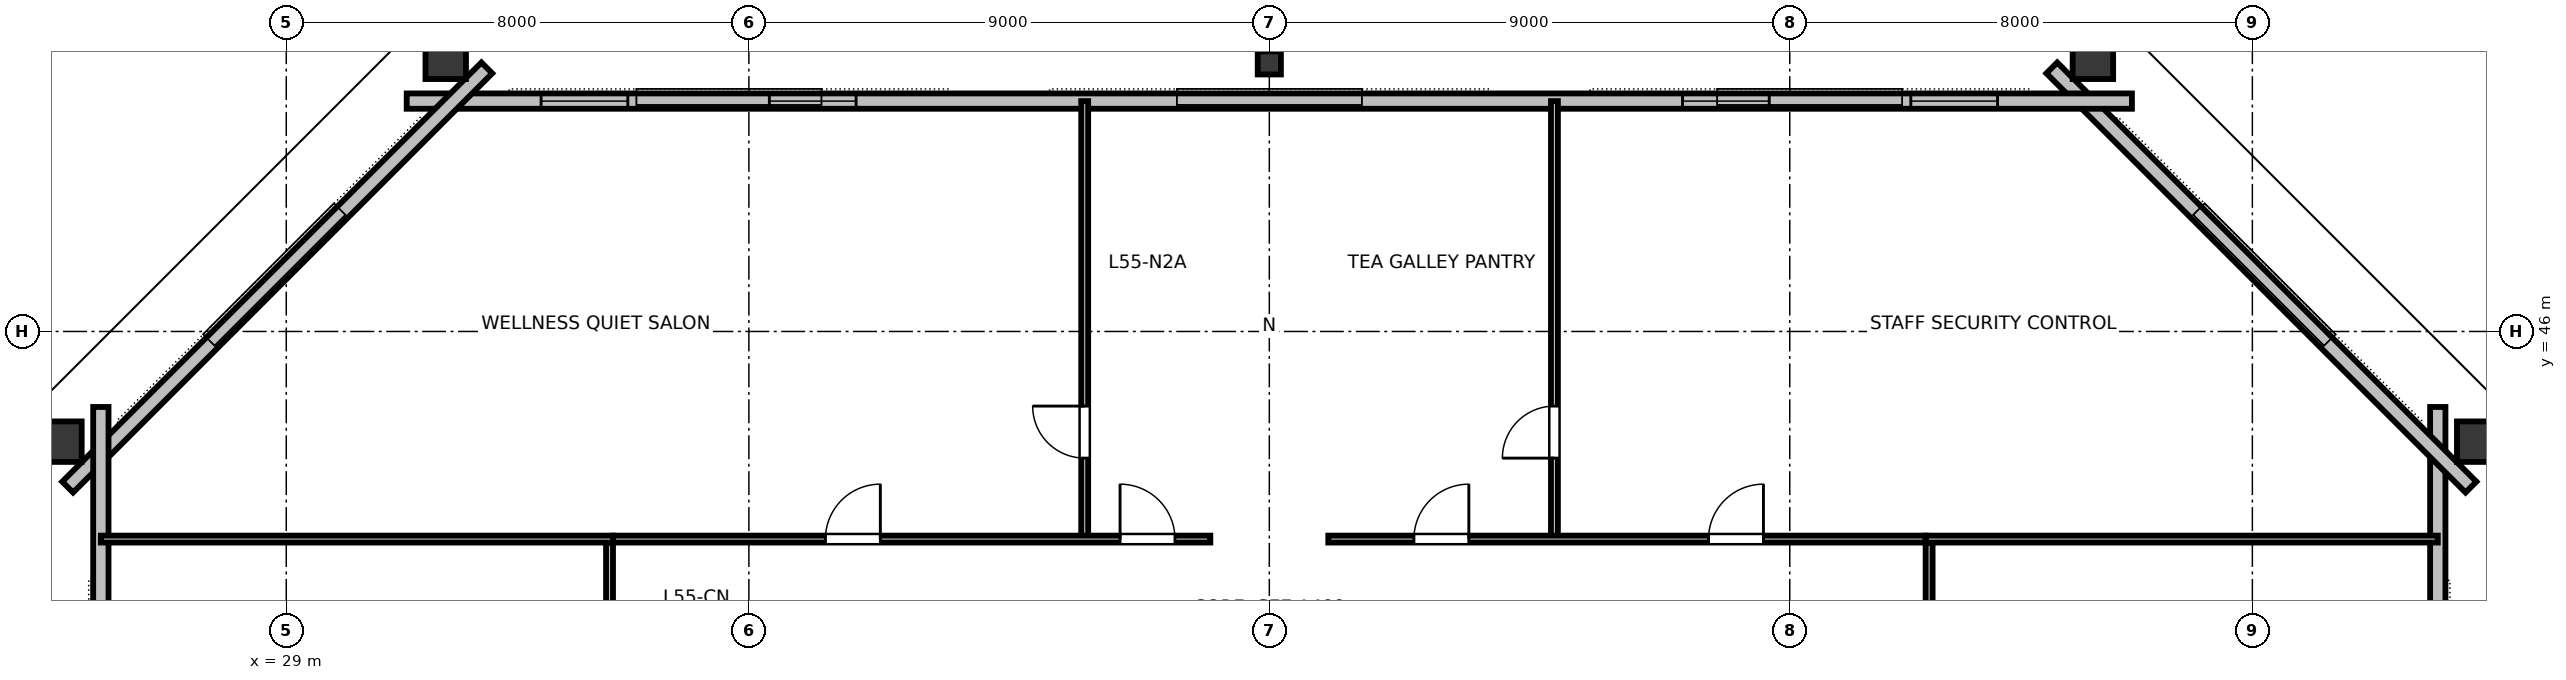
"""IFC4 building model, lengths in metres.
Left out: names, types, materials, properties, quantities, classifications, styles, units other than length and angle.
Written with IfcOpenShell. Run it as: python <this file> out.ifc"""

import sys

from ifc_helpers import new_model, si_unit, direction, frame, frame_2d, origin, origin_2d, place, context, subcontext, project, spatial, rectangle, hollow_rectangle, i_section, extrude, element, fill, save


model = new_model("IFC4")
c1 = context("Model", 3, precision=1e-05, world=origin(), true_north=direction((0.0, 1.0)))
c2 = subcontext(c1, "Body", "Model", "MODEL_VIEW")
j1 = project(units=[si_unit("LENGTHUNIT", "METRE"), si_unit("PLANEANGLEUNIT", "RADIAN")], contexts=[c1])
p1 = place(None, origin())
s1 = spatial("IfcSite", under=j1, at=p1, CompositionType="ELEMENT")
p2 = place(p1, origin())
s2 = spatial("IfcBuilding", under=s1, at=p2, CompositionType="ELEMENT")
p3 = place(p2, frame((0.0, 0.0, 209.4)))
s3 = spatial("IfcBuildingStorey", under=s2, at=p3, CompositionType="ELEMENT", Elevation=209.4)
for number, where, z_axis, x_axis in (
    (1, (66.963, 44.095, 0.0), (0.0, 0.0, 1.0), (0.0, 1.0, 0.0)),
    (2, (60.242, 50.79, 0.0), (0.0, 0.0, 1.0), (1.0, 0.0, 0.0)),
):
    element("IfcColumn", number, at=place(p3, frame(where, z_axis=z_axis, x_axis=x_axis)), inside=s3, PredefinedType="COLUMN", context=c2, shape_type="SweptSolid", body=[
        extrude(hollow_rectangle(XDim=0.7, YDim=0.85, WallThickness=0.04, at=origin_2d()), origin(), (0.0, 0.0, 1.0), 3.373),
    ])
p4 = place(p3, frame((46.0, 50.644, 0.0), z_axis=(0.0, 0.0, 1.0), x_axis=(1.0, 0.0, 0.0)))
e3 = element("IfcColumn", 3, at=p4, inside=s3, PredefinedType="COLUMN", context=c2, shape_type="SweptSolid", body=[
    extrude(i_section(OverallWidth=0.401, OverallDepth=0.399, WebThickness=0.025, FlangeThickness=0.04, FilletRadius=0.025, at=origin_2d()), origin(), (0.0, 0.0, 1.0), 3.373),
])
for number, where, z_axis, x_axis in (
    (4, (31.758, 50.79, 0.0), (0.0, 0.0, 1.0), (1.0, 0.0, 0.0)),
    (5, (25.037, 44.095, 0.0), (0.0, 0.0, 1.0), (0.0, 1.0, 0.0)),
):
    element("IfcColumn", number, at=place(p3, frame(where, z_axis=z_axis, x_axis=x_axis)), inside=s3, PredefinedType="COLUMN", context=c2, shape_type="SweptSolid", body=[
        extrude(hollow_rectangle(XDim=0.7, YDim=0.85, WallThickness=0.04, at=origin_2d()), origin(), (0.0, 0.0, 1.0), 3.373),
    ])
p5 = place(p3, frame((66.206, 19.305, 0.0), z_axis=(0.0, 0.0, 1.0), x_axis=(0.0, 1.0, 0.0)))
e6 = element("IfcWall", 6, at=p5, inside=s3, PredefinedType="STANDARD", context=c2, shape_type="SweptSolid", body=[
    extrude(rectangle(XDim=25.389, YDim=0.265, at=frame_2d((12.695, 0.0))), origin(), (0.0, 0.0, 1.0), 3.375),
])
p6 = place(p5, frame((6.147, 0.0, 0.85)))
e7 = element("IfcOpeningElement", 7, at=p6, cuts=e6, PredefinedType="OPENING", context=c2, shape_type="SweptSolid", body=[
    extrude(rectangle(XDim=1.5, YDim=1.85, at=frame_2d((0.75, 0.925))), frame((0.0, 0.142, 0.0), z_axis=(0.0, -1.0, 0.0), x_axis=(1.0, 0.0, 0.0)), (0.0, 0.0, 1.0), 0.285),
])
p7 = place(p5, frame((17.742, 0.0, 0.85)))
e8 = element("IfcOpeningElement", 8, at=p7, cuts=e6, PredefinedType="OPENING", context=c2, shape_type="SweptSolid", body=[
    extrude(rectangle(XDim=1.5, YDim=1.85, at=frame_2d((0.75, 0.925))), frame((0.0, 0.142, 0.0), z_axis=(0.0, -1.0, 0.0), x_axis=(1.0, 0.0, 0.0)), (0.0, 0.0, 1.0), 0.285),
])
p8 = place(p3, frame((66.78, 43.309, 0.0), z_axis=(0.0, 0.0, 1.0), x_axis=(-0.707106781187, 0.707106781187, 0.0)))
e9 = element("IfcWall", 9, at=p8, inside=s3, PredefinedType="STANDARD", context=c2, shape_type="SweptSolid", body=[
    extrude(rectangle(XDim=10.251, YDim=0.265, at=frame_2d((5.125, 0.0))), origin(), (0.0, 0.0, 1.0), 3.375),
])
p9 = place(p3, frame((60.917, 49.984, 0.0), z_axis=(0.0, 0.0, 1.0), x_axis=(-1.0, 0.0, 0.0)))
e10 = element("IfcWall", 10, at=p9, inside=s3, PredefinedType="STANDARD", context=c2, shape_type="SweptSolid", body=[
    extrude(rectangle(XDim=29.834, YDim=0.265, at=frame_2d((14.917, 0.0))), origin(), (0.0, 0.0, 1.0), 3.375),
])
p10 = place(p9, frame((2.324, 0.0, 0.85)))
e11 = element("IfcOpeningElement", 11, at=p10, cuts=e10, PredefinedType="OPENING", context=c2, shape_type="SweptSolid", body=[
    extrude(rectangle(XDim=1.5, YDim=1.85, at=frame_2d((0.75, 0.925))), frame((0.0, 0.142, 0.0), z_axis=(0.0, -1.0, 0.0), x_axis=(1.0, 0.0, 0.0)), (0.0, 0.0, 1.0), 0.285),
])
p11 = place(p9, frame((6.272, 0.0, 0.85)))
e12 = element("IfcOpeningElement", 12, at=p11, cuts=e10, PredefinedType="OPENING", context=c2, shape_type="SweptSolid", body=[
    extrude(rectangle(XDim=1.5, YDim=1.85, at=frame_2d((0.75, 0.925))), frame((0.0, 0.142, 0.0), z_axis=(0.0, -1.0, 0.0), x_axis=(1.0, 0.0, 0.0)), (0.0, 0.0, 1.0), 0.285),
])
p12 = place(p9, frame((22.063, 0.0, 0.85)))
e13 = element("IfcOpeningElement", 13, at=p12, cuts=e10, PredefinedType="OPENING", context=c2, shape_type="SweptSolid", body=[
    extrude(rectangle(XDim=1.5, YDim=1.85, at=frame_2d((0.75, 0.925))), frame((0.0, 0.142, 0.0), z_axis=(0.0, -1.0, 0.0), x_axis=(1.0, 0.0, 0.0)), (0.0, 0.0, 1.0), 0.285),
])
p13 = place(p9, frame((26.011, 0.0, 0.85)))
e14 = element("IfcOpeningElement", 14, at=p13, cuts=e10, PredefinedType="OPENING", context=c2, shape_type="SweptSolid", body=[
    extrude(rectangle(XDim=1.5, YDim=1.85, at=frame_2d((0.75, 0.925))), frame((0.0, 0.142, 0.0), z_axis=(0.0, -1.0, 0.0), x_axis=(1.0, 0.0, 0.0)), (0.0, 0.0, 1.0), 0.285),
])
p14 = place(p3, frame((32.468, 50.558, 0.0), z_axis=(0.0, 0.0, 1.0), x_axis=(-0.707106781187, -0.707106781187, 0.0)))
e15 = element("IfcWall", 15, at=p14, inside=s3, PredefinedType="STANDARD", context=c2, shape_type="SweptSolid", body=[
    extrude(rectangle(XDim=10.251, YDim=0.265, at=frame_2d((5.125, 0.0))), origin(), (0.0, 0.0, 1.0), 3.375),
])
p15 = place(p3, frame((25.794, 44.695, 0.0), z_axis=(0.0, 0.0, 1.0), x_axis=(0.0, -1.0, 0.0)))
e16 = element("IfcWall", 16, at=p15, inside=s3, PredefinedType="STANDARD", context=c2, shape_type="SweptSolid", body=[
    extrude(rectangle(XDim=25.389, YDim=0.265, at=frame_2d((12.695, 0.0))), origin(), (0.0, 0.0, 1.0), 3.375),
])
p16 = place(p15, frame((6.147, 0.0, 0.85)))
e17 = element("IfcOpeningElement", 17, at=p16, cuts=e16, PredefinedType="OPENING", context=c2, shape_type="SweptSolid", body=[
    extrude(rectangle(XDim=1.5, YDim=1.85, at=frame_2d((0.75, 0.925))), frame((0.0, 0.142, 0.0), z_axis=(0.0, -1.0, 0.0), x_axis=(1.0, 0.0, 0.0)), (0.0, 0.0, 1.0), 0.285),
])
p17 = place(p15, frame((10.012, 0.0, 0.85)))
e18 = element("IfcOpeningElement", 18, at=p17, cuts=e16, PredefinedType="OPENING", context=c2, shape_type="SweptSolid", body=[
    extrude(rectangle(XDim=1.5, YDim=1.85, at=frame_2d((0.75, 0.925))), frame((0.0, 0.142, 0.0), z_axis=(0.0, -1.0, 0.0), x_axis=(1.0, 0.0, 0.0)), (0.0, 0.0, 1.0), 0.285),
])
p18 = place(p15, frame((13.877, 0.0, 0.85)))
e19 = element("IfcOpeningElement", 19, at=p18, cuts=e16, PredefinedType="OPENING", context=c2, shape_type="SweptSolid", body=[
    extrude(rectangle(XDim=1.5, YDim=1.85, at=frame_2d((0.75, 0.925))), frame((0.0, 0.142, 0.0), z_axis=(0.0, -1.0, 0.0), x_axis=(1.0, 0.0, 0.0)), (0.0, 0.0, 1.0), 0.285),
])
p19 = place(p15, frame((17.742, 0.0, 0.85)))
e20 = element("IfcOpeningElement", 20, at=p19, cuts=e16, PredefinedType="OPENING", context=c2, shape_type="SweptSolid", body=[
    extrude(rectangle(XDim=1.5, YDim=1.85, at=frame_2d((0.75, 0.925))), frame((0.0, 0.142, 0.0), z_axis=(0.0, -1.0, 0.0), x_axis=(1.0, 0.0, 0.0)), (0.0, 0.0, 1.0), 0.285),
])
p20 = place(p3, frame((42.807, 42.41, 0.0), z_axis=(0.0, 0.0, 1.0), x_axis=(0.0, 1.0, 0.0)))
e21 = element("IfcWall", 21, at=p20, inside=s3, PredefinedType="PARTITIONING", context=c2, shape_type="SweptSolid", body=[
    extrude(rectangle(XDim=7.574, YDim=0.12, at=frame_2d((3.787, 0.0))), origin(), (0.0, 0.0, 1.0), 2.655),
])
p21 = place(p20, frame((1.4, 0.0, 0.0)))
e22 = element("IfcOpeningElement", 22, at=p21, cuts=e21, PredefinedType="OPENING", context=c2, shape_type="SweptSolid", body=[
    extrude(rectangle(XDim=0.9, YDim=2.15, at=frame_2d((0.45, 1.075))), frame((0.0, 0.07, 0.0), z_axis=(0.0, -1.0, 0.0), x_axis=(1.0, 0.0, 0.0)), (0.0, 0.0, 1.0), 0.14),
])
p22 = place(p3, frame((50.93, 42.41, 0.0), z_axis=(0.0, 0.0, 1.0), x_axis=(0.0, 1.0, 0.0)))
e23 = element("IfcWall", 23, at=p22, inside=s3, PredefinedType="PARTITIONING", context=c2, shape_type="SweptSolid", body=[
    extrude(rectangle(XDim=7.574, YDim=0.12, at=frame_2d((3.787, 0.0))), origin(), (0.0, 0.0, 1.0), 2.655),
])
p23 = place(p22, frame((1.4, 0.0, 0.0)))
e24 = element("IfcOpeningElement", 24, at=p23, cuts=e23, PredefinedType="OPENING", context=c2, shape_type="SweptSolid", body=[
    extrude(rectangle(XDim=0.9, YDim=2.15, at=frame_2d((0.45, 1.075))), frame((0.0, 0.07, 0.0), z_axis=(0.0, -1.0, 0.0), x_axis=(1.0, 0.0, 0.0)), (0.0, 0.0, 1.0), 0.14),
])
p24 = place(p3, frame((34.65, 42.41, 0.0), z_axis=(0.0, 0.0, 1.0), x_axis=(1.0, 0.0, 0.0)))
e25 = element("IfcWall", 25, at=p24, inside=s3, PredefinedType="PARTITIONING", context=c2, shape_type="SweptSolid", body=[
    extrude(rectangle(XDim=10.33, YDim=0.12, at=frame_2d((5.165, 0.0))), origin(), (0.0, 0.0, 1.0), 2.655),
])
p25 = place(p24, frame((3.674, 0.0, 0.0)))
e26 = element("IfcOpeningElement", 26, at=p25, cuts=e25, PredefinedType="OPENING", context=c2, shape_type="SweptSolid", body=[
    extrude(rectangle(XDim=0.95, YDim=2.15, at=frame_2d((0.475, 1.075))), frame((0.0, 0.07, 0.0), z_axis=(0.0, -1.0, 0.0), x_axis=(1.0, 0.0, 0.0)), (0.0, 0.0, 1.0), 0.14),
])
p26 = place(p24, frame((8.769, 0.0, 0.0)))
e27 = element("IfcOpeningElement", 27, at=p26, cuts=e25, PredefinedType="OPENING", context=c2, shape_type="SweptSolid", body=[
    extrude(rectangle(XDim=0.95, YDim=2.15, at=frame_2d((0.475, 1.075))), frame((0.0, 0.07, 0.0), z_axis=(0.0, -1.0, 0.0), x_axis=(1.0, 0.0, 0.0)), (0.0, 0.0, 1.0), 0.14),
])
p27 = place(p3, frame((47.02, 42.41, 0.0), z_axis=(0.0, 0.0, 1.0), x_axis=(1.0, 0.0, 0.0)))
e28 = element("IfcWall", 28, at=p27, inside=s3, PredefinedType="PARTITIONING", context=c2, shape_type="SweptSolid", body=[
    extrude(rectangle(XDim=10.33, YDim=0.12, at=frame_2d((5.165, 0.0))), origin(), (0.0, 0.0, 1.0), 2.655),
])
p28 = place(p27, frame((1.48, 0.0, 0.0)))
e29 = element("IfcOpeningElement", 29, at=p28, cuts=e28, PredefinedType="OPENING", context=c2, shape_type="SweptSolid", body=[
    extrude(rectangle(XDim=0.95, YDim=2.15, at=frame_2d((0.475, 1.075))), frame((0.0, 0.07, 0.0), z_axis=(0.0, -1.0, 0.0), x_axis=(1.0, 0.0, 0.0)), (0.0, 0.0, 1.0), 0.14),
])
p29 = place(p27, frame((6.575, 0.0, 0.0)))
e30 = element("IfcOpeningElement", 30, at=p29, cuts=e28, PredefinedType="OPENING", context=c2, shape_type="SweptSolid", body=[
    extrude(rectangle(XDim=0.95, YDim=2.15, at=frame_2d((0.475, 1.075))), frame((0.0, 0.07, 0.0), z_axis=(0.0, -1.0, 0.0), x_axis=(1.0, 0.0, 0.0)), (0.0, 0.0, 1.0), 0.14),
])
p30 = place(p3, frame((34.59, 21.65, 0.0), z_axis=(0.0, 0.0, 1.0), x_axis=(0.0, 1.0, 0.0)))
e31 = element("IfcWall", 31, at=p30, inside=s3, PredefinedType="PARTITIONING", context=c2, shape_type="SweptSolid", body=[
    extrude(rectangle(XDim=20.7, YDim=0.12, at=frame_2d((10.35, 0.0))), origin(), (0.0, 0.0, 1.0), 2.655),
])
p31 = place(p30, frame((9.875, 0.0, 0.0)))
e32 = element("IfcOpeningElement", 32, at=p31, cuts=e31, PredefinedType="OPENING", context=c2, shape_type="SweptSolid", body=[
    extrude(rectangle(XDim=0.95, YDim=2.15, at=frame_2d((0.475, 1.075))), frame((0.0, 0.07, 0.0), z_axis=(0.0, -1.0, 0.0), x_axis=(1.0, 0.0, 0.0)), (0.0, 0.0, 1.0), 0.14),
])
p32 = place(p3, frame((57.41, 21.65, 0.0), z_axis=(0.0, 0.0, 1.0), x_axis=(0.0, 1.0, 0.0)))
e33 = element("IfcWall", 33, at=p32, inside=s3, PredefinedType="PARTITIONING", context=c2, shape_type="SweptSolid", body=[
    extrude(rectangle(XDim=20.7, YDim=0.12, at=frame_2d((10.35, 0.0))), origin(), (0.0, 0.0, 1.0), 2.655),
])
p33 = place(p32, frame((3.546, 0.0, 0.0)))
e34 = element("IfcOpeningElement", 34, at=p33, cuts=e33, PredefinedType="OPENING", context=c2, shape_type="SweptSolid", body=[
    extrude(rectangle(XDim=0.95, YDim=2.15, at=frame_2d((0.475, 1.075))), frame((0.0, 0.07, 0.0), z_axis=(0.0, -1.0, 0.0), x_axis=(1.0, 0.0, 0.0)), (0.0, 0.0, 1.0), 0.14),
])
p34 = place(p32, frame((10.054, 0.0, 0.0)))
e35 = element("IfcOpeningElement", 35, at=p34, cuts=e33, PredefinedType="OPENING", context=c2, shape_type="SweptSolid", body=[
    extrude(rectangle(XDim=0.95, YDim=2.15, at=frame_2d((0.475, 1.075))), frame((0.0, 0.07, 0.0), z_axis=(0.0, -1.0, 0.0), x_axis=(1.0, 0.0, 0.0)), (0.0, 0.0, 1.0), 0.14),
])
p35 = place(p32, frame((16.384, 0.0, 0.0)))
e36 = element("IfcOpeningElement", 36, at=p35, cuts=e33, PredefinedType="OPENING", context=c2, shape_type="SweptSolid", body=[
    extrude(rectangle(XDim=0.95, YDim=2.15, at=frame_2d((0.475, 1.075))), frame((0.0, 0.07, 0.0), z_axis=(0.0, -1.0, 0.0), x_axis=(1.0, 0.0, 0.0)), (0.0, 0.0, 1.0), 0.14),
])
for number, where, z_axis, x_axis in (
    (37, (34.65, 42.41, 0.0), (0.0, 0.0, 1.0), (-1.0, 0.0, 0.0)),
    (38, (57.35, 42.41, 0.0), (0.0, 0.0, 1.0), (1.0, 0.0, 0.0)),
):
    element("IfcWall", number, at=place(p3, frame(where, z_axis=z_axis, x_axis=x_axis)), inside=s3, PredefinedType="PARTITIONING", context=c2, shape_type="SweptSolid", body=[
        extrude(rectangle(XDim=8.856, YDim=0.12, at=frame_2d((4.428, 0.0))), origin(), (0.0, 0.0, 1.0), 2.655),
    ])
p36 = place(p10, origin())
e39 = element("IfcWindow", 39, at=p36, inside=s3, PartitioningType="SINGLE_PANEL", PredefinedType="WINDOW", context=c2, shape_type="SweptSolid", body=[
    extrude(rectangle(XDim=1.5, YDim=1.85, at=frame_2d((0.75, 0.925))), frame((0.0, 0.03, 0.0), z_axis=(0.0, -1.0, 0.0), x_axis=(1.0, 0.0, 0.0)), (0.0, 0.0, 1.0), 0.06),
])
fill(e11, e39)
p37 = place(p11, origin())
e40 = element("IfcWindow", 40, at=p37, inside=s3, PartitioningType="SINGLE_PANEL", PredefinedType="WINDOW", context=c2, shape_type="SweptSolid", body=[
    extrude(rectangle(XDim=1.5, YDim=1.85, at=frame_2d((0.75, 0.925))), frame((0.0, 0.03, 0.0), z_axis=(0.0, -1.0, 0.0), x_axis=(1.0, 0.0, 0.0)), (0.0, 0.0, 1.0), 0.06),
])
fill(e12, e40)
p38 = place(p12, origin())
e41 = element("IfcWindow", 41, at=p38, inside=s3, PartitioningType="SINGLE_PANEL", PredefinedType="WINDOW", context=c2, shape_type="SweptSolid", body=[
    extrude(rectangle(XDim=1.5, YDim=1.85, at=frame_2d((0.75, 0.925))), frame((0.0, 0.03, 0.0), z_axis=(0.0, -1.0, 0.0), x_axis=(1.0, 0.0, 0.0)), (0.0, 0.0, 1.0), 0.06),
])
fill(e13, e41)
p39 = place(p13, origin())
e42 = element("IfcWindow", 42, at=p39, inside=s3, PartitioningType="SINGLE_PANEL", PredefinedType="WINDOW", context=c2, shape_type="SweptSolid", body=[
    extrude(rectangle(XDim=1.5, YDim=1.85, at=frame_2d((0.75, 0.925))), frame((0.0, 0.03, 0.0), z_axis=(0.0, -1.0, 0.0), x_axis=(1.0, 0.0, 0.0)), (0.0, 0.0, 1.0), 0.06),
])
fill(e14, e42)
p40 = place(p21, origin())
e43 = element("IfcDoor", 43, at=p40, inside=s3, OperationType="SINGLE_SWING_RIGHT", PredefinedType="DOOR", context=c2, shape_type="SweptSolid", body=[
    extrude(rectangle(XDim=0.9, YDim=2.15, at=frame_2d((0.45, 1.075))), frame((0.0, 0.025, 0.0), z_axis=(0.0, -1.0, 0.0), x_axis=(1.0, 0.0, 0.0)), (0.0, 0.0, 1.0), 0.05),
])
fill(e22, e43)
p41 = place(p23, origin())
e44 = element("IfcDoor", 44, at=p41, inside=s3, OperationType="SINGLE_SWING_LEFT", PredefinedType="DOOR", context=c2, shape_type="SweptSolid", body=[
    extrude(rectangle(XDim=0.9, YDim=2.15, at=frame_2d((0.45, 1.075))), frame((0.0, 0.025, 0.0), z_axis=(0.0, -1.0, 0.0), x_axis=(1.0, 0.0, 0.0)), (0.0, 0.0, 1.0), 0.05),
])
fill(e24, e44)
p42 = place(p25, origin())
e45 = element("IfcDoor", 45, at=p42, inside=s3, OperationType="SINGLE_SWING_RIGHT", PredefinedType="DOOR", context=c2, shape_type="SweptSolid", body=[
    extrude(rectangle(XDim=0.95, YDim=2.15, at=frame_2d((0.475, 1.075))), frame((0.0, 0.025, 0.0), z_axis=(0.0, -1.0, 0.0), x_axis=(1.0, 0.0, 0.0)), (0.0, 0.0, 1.0), 0.05),
])
fill(e26, e45)
p43 = place(p26, origin())
e46 = element("IfcDoor", 46, at=p43, inside=s3, OperationType="SINGLE_SWING_LEFT", PredefinedType="DOOR", context=c2, shape_type="SweptSolid", body=[
    extrude(rectangle(XDim=0.95, YDim=2.15, at=frame_2d((0.475, 1.075))), frame((0.0, 0.025, 0.0), z_axis=(0.0, -1.0, 0.0), x_axis=(1.0, 0.0, 0.0)), (0.0, 0.0, 1.0), 0.05),
])
fill(e27, e46)
p44 = place(p28, origin())
e47 = element("IfcDoor", 47, at=p44, inside=s3, OperationType="SINGLE_SWING_RIGHT", PredefinedType="DOOR", context=c2, shape_type="SweptSolid", body=[
    extrude(rectangle(XDim=0.95, YDim=2.15, at=frame_2d((0.475, 1.075))), frame((0.0, 0.025, 0.0), z_axis=(0.0, -1.0, 0.0), x_axis=(1.0, 0.0, 0.0)), (0.0, 0.0, 1.0), 0.05),
])
fill(e29, e47)
p45 = place(p29, origin())
e48 = element("IfcDoor", 48, at=p45, inside=s3, OperationType="SINGLE_SWING_RIGHT", PredefinedType="DOOR", context=c2, shape_type="SweptSolid", body=[
    extrude(rectangle(XDim=0.95, YDim=2.15, at=frame_2d((0.475, 1.075))), frame((0.0, 0.025, 0.0), z_axis=(0.0, -1.0, 0.0), x_axis=(1.0, 0.0, 0.0)), (0.0, 0.0, 1.0), 0.05),
])
fill(e30, e48)
save(model, sys.argv[1])
